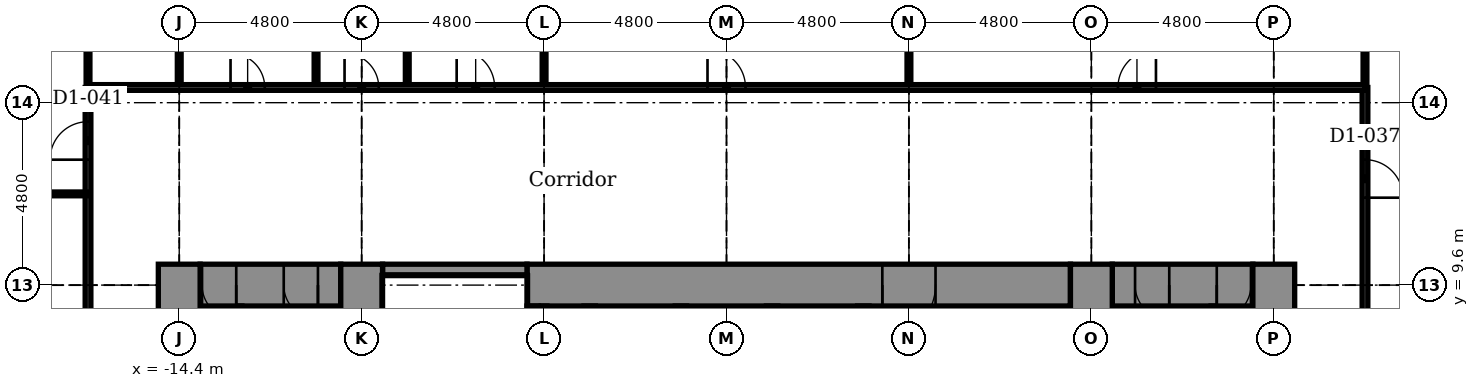
"""IFC4 building model, lengths in metres.
Left out: names, types, materials, properties, quantities, classifications, styles, units other than length and angle.
Written with IfcOpenShell. Run it as: python <this file> out.ifc"""

import sys

from ifc_helpers import new_model, si_unit, direction, frame, frame_2d, origin, place, context, subcontext, project, spatial, rectangle, extrude, element, fill, save


model = new_model("IFC4")
c1 = context("Model", 3, precision=1e-05, world=origin(), true_north=direction((0.0, 1.0)))
c2 = subcontext(c1, "Body", "Model", "MODEL_VIEW")
j1 = project(units=[si_unit("LENGTHUNIT", "METRE"), si_unit("PLANEANGLEUNIT", "RADIAN")], contexts=[c1])
p1 = place(None, origin())
s1 = spatial("IfcSite", under=j1, at=p1, CompositionType="ELEMENT")
p2 = place(p1, origin())
s2 = spatial("IfcBuilding", under=s1, at=p2, CompositionType="ELEMENT")
p3 = place(p2, frame((0.0, 0.0, 12.4)))
s3 = spatial("IfcBuildingStorey", under=s2, at=p3, CompositionType="ELEMENT", Elevation=12.4)
p4 = place(p3, frame((-13.85, 9.6, -0.3), z_axis=(0.0, 0.0, 1.0), x_axis=(1.0, 0.0, 0.0)))
e1 = element("IfcWall", 1, at=p4, inside=s3, PredefinedType="SHEAR", context=c2, shape_type="SweptSolid", body=[
    extrude(rectangle(XDim=3.7, YDim=1.1, at=frame_2d((1.85, 0.0))), origin(), (0.0, 0.0, 1.0), 5.05),
])
p5 = place(p4, frame((0.05, 0.0, 0.3)))
e2 = element("IfcOpeningElement", 2, at=p5, cuts=e1, PredefinedType="OPENING", context=c2, shape_type="SweptSolid", body=[
    extrude(rectangle(XDim=0.9, YDim=2.1, at=frame_2d((0.45, 1.05))), frame((0.0, 0.56, 0.0), z_axis=(0.0, -1.0, 0.0), x_axis=(1.0, 0.0, 0.0)), (0.0, 0.0, 1.0), 1.12),
])
p6 = place(p4, frame((2.2, 0.0, 0.3)))
e3 = element("IfcOpeningElement", 3, at=p6, cuts=e1, PredefinedType="OPENING", context=c2, shape_type="SweptSolid", body=[
    extrude(rectangle(XDim=0.9, YDim=2.1, at=frame_2d((0.45, 1.05))), frame((0.0, 0.56, 0.0), z_axis=(0.0, -1.0, 0.0), x_axis=(1.0, 0.0, 0.0)), (0.0, 0.0, 1.0), 1.12),
])
p7 = place(p3, frame((-5.25, 9.6, -0.3), z_axis=(0.0, 0.0, 1.0), x_axis=(1.0, 0.0, 0.0)))
e4 = element("IfcWall", 4, at=p7, inside=s3, PredefinedType="SHEAR", context=c2, shape_type="SweptSolid", body=[
    extrude(rectangle(XDim=14.3, YDim=1.1, at=frame_2d((7.15, 0.0))), origin(), (0.0, 0.0, 1.0), 5.05),
])
p8 = place(p7, frame((9.35, 0.0, 0.3)))
e5 = element("IfcOpeningElement", 5, at=p8, cuts=e4, PredefinedType="OPENING", context=c2, shape_type="SweptSolid", body=[
    extrude(rectangle(XDim=1.4, YDim=2.1, at=frame_2d((0.7, 1.05))), frame((0.0, 0.56, 0.0), z_axis=(0.0, -1.0, 0.0), x_axis=(1.0, 0.0, 0.0)), (0.0, 0.0, 1.0), 1.12),
])
p9 = place(p3, frame((10.15, 9.6, -0.3), z_axis=(0.0, 0.0, 1.0), x_axis=(1.0, 0.0, 0.0)))
e6 = element("IfcWall", 6, at=p9, inside=s3, PredefinedType="SHEAR", context=c2, shape_type="SweptSolid", body=[
    extrude(rectangle(XDim=3.7, YDim=1.1, at=frame_2d((1.85, 0.0))), origin(), (0.0, 0.0, 1.0), 5.05),
])
p10 = place(p9, frame((0.6, 0.0, 0.3)))
e7 = element("IfcOpeningElement", 7, at=p10, cuts=e6, PredefinedType="OPENING", context=c2, shape_type="SweptSolid", body=[
    extrude(rectangle(XDim=0.9, YDim=2.1, at=frame_2d((0.45, 1.05))), frame((0.0, 0.56, 0.0), z_axis=(0.0, -1.0, 0.0), x_axis=(1.0, 0.0, 0.0)), (0.0, 0.0, 1.0), 1.12),
])
p11 = place(p9, frame((2.75, 0.0, 0.3)))
e8 = element("IfcOpeningElement", 8, at=p11, cuts=e6, PredefinedType="OPENING", context=c2, shape_type="SweptSolid", body=[
    extrude(rectangle(XDim=0.9, YDim=2.1, at=frame_2d((0.45, 1.05))), frame((0.0, 0.56, 0.0), z_axis=(0.0, -1.0, 0.0), x_axis=(1.0, 0.0, 0.0)), (0.0, 0.0, 1.0), 1.12),
])
p12 = place(p3, frame((-9.05, 10.0, -0.3), z_axis=(0.0, 0.0, 1.0), x_axis=(1.0, 0.0, 0.0)))
e9 = element("IfcWall", 9, at=p12, inside=s3, PredefinedType="STANDARD", context=c2, shape_type="SweptSolid", body=[
    extrude(rectangle(XDim=3.8, YDim=0.3, at=frame_2d((1.9, 0.0))), origin(), (0.0, 0.0, 1.0), 5.05),
])
p13 = place(p3, frame((-14.4, -10.15, -0.3), z_axis=(0.0, 0.0, 1.0), x_axis=(0.0, 1.0, 0.0)))
e10 = element("IfcWall", 10, at=p13, inside=s3, PredefinedType="SHEAR", context=c2, shape_type="SweptSolid", body=[
    extrude(rectangle(XDim=20.3, YDim=1.1, at=frame_2d((10.15, 0.0))), origin(), (0.0, 0.0, 1.0), 5.05),
])
p14 = place(p13, frame((3.6, 0.0, 0.3)))
e11 = element("IfcOpeningElement", 11, at=p14, cuts=e10, PredefinedType="OPENING", context=c2, shape_type="SweptSolid", body=[
    extrude(rectangle(XDim=1.1, YDim=2.1, at=frame_2d((0.55, 1.05))), frame((0.0, 0.56, 0.0), z_axis=(0.0, -1.0, 0.0), x_axis=(1.0, 0.0, 0.0)), (0.0, 0.0, 1.0), 1.12),
])
p15 = place(p13, frame((6.0, 0.0, 0.3)))
e12 = element("IfcOpeningElement", 12, at=p15, cuts=e10, PredefinedType="OPENING", context=c2, shape_type="SweptSolid", body=[
    extrude(rectangle(XDim=1.1, YDim=2.1, at=frame_2d((0.55, 1.05))), frame((0.0, 0.56, 0.0), z_axis=(0.0, -1.0, 0.0), x_axis=(1.0, 0.0, 0.0)), (0.0, 0.0, 1.0), 1.12),
])
p16 = place(p13, frame((8.4, 0.0, 0.3)))
e13 = element("IfcOpeningElement", 13, at=p16, cuts=e10, PredefinedType="OPENING", context=c2, shape_type="SweptSolid", body=[
    extrude(rectangle(XDim=1.1, YDim=2.1, at=frame_2d((0.55, 1.05))), frame((0.0, 0.56, 0.0), z_axis=(0.0, -1.0, 0.0), x_axis=(1.0, 0.0, 0.0)), (0.0, 0.0, 1.0), 1.12),
])
p17 = place(p13, frame((10.8, 0.0, 0.3)))
e14 = element("IfcOpeningElement", 14, at=p17, cuts=e10, PredefinedType="OPENING", context=c2, shape_type="SweptSolid", body=[
    extrude(rectangle(XDim=1.1, YDim=2.1, at=frame_2d((0.55, 1.05))), frame((0.0, 0.56, 0.0), z_axis=(0.0, -1.0, 0.0), x_axis=(1.0, 0.0, 0.0)), (0.0, 0.0, 1.0), 1.12),
])
p18 = place(p3, frame((-9.6, 2.55, -0.3), z_axis=(0.0, 0.0, 1.0), x_axis=(0.0, 1.0, 0.0)))
e15 = element("IfcWall", 15, at=p18, inside=s3, PredefinedType="SHEAR", context=c2, shape_type="SweptSolid", body=[
    extrude(rectangle(XDim=7.6, YDim=1.1, at=frame_2d((3.8, 0.0))), origin(), (0.0, 0.0, 1.0), 5.05),
])
p19 = place(p3, frame((-5.1, 2.25, -0.3), z_axis=(0.0, 0.0, 1.0), x_axis=(0.0, 1.0, 0.0)))
e16 = element("IfcWall", 16, at=p19, inside=s3, PredefinedType="STANDARD", context=c2, shape_type="SweptSolid", body=[
    extrude(rectangle(XDim=6.8, YDim=0.3, at=frame_2d((3.4, 0.0))), origin(), (0.0, 0.0, 1.0), 5.05),
])
p20 = place(p19, frame((2.0, 0.0, 0.3)))
e17 = element("IfcOpeningElement", 17, at=p20, cuts=e16, PredefinedType="OPENING", context=c2, shape_type="SweptSolid", body=[
    extrude(rectangle(XDim=1.2, YDim=2.1, at=frame_2d((0.6, 1.05))), frame((0.0, 0.16, 0.0), z_axis=(0.0, -1.0, 0.0), x_axis=(1.0, 0.0, 0.0)), (0.0, 0.0, 1.0), 0.32),
])
for number, where, z_axis, x_axis in (
    (18, (-3.6, 5.85, -0.3), (0.0, 0.0, 1.0), (0.0, 1.0, 0.0)),
    (19, (-1.2, 5.85, -0.3), (0.0, 0.0, 1.0), (0.0, 1.0, 0.0)),
    (20, (1.2, 5.85, -0.3), (0.0, 0.0, 1.0), (0.0, 1.0, 0.0)),
    (21, (3.6, 5.85, -0.3), (0.0, 0.0, 1.0), (0.0, 1.0, 0.0)),
):
    element("IfcWall", number, at=place(p3, frame(where, z_axis=z_axis, x_axis=x_axis)), inside=s3, PredefinedType="STANDARD", context=c2, shape_type="SweptSolid", body=[
        extrude(rectangle(XDim=3.2, YDim=0.3, at=frame_2d((1.6, 0.0))), origin(), (0.0, 0.0, 1.0), 5.05),
    ])
p21 = place(p3, frame((9.6, -10.15, -0.3), z_axis=(0.0, 0.0, 1.0), x_axis=(0.0, 1.0, 0.0)))
e22 = element("IfcWall", 22, at=p21, inside=s3, PredefinedType="SHEAR", context=c2, shape_type="SweptSolid", body=[
    extrude(rectangle(XDim=20.3, YDim=1.1, at=frame_2d((10.15, 0.0))), origin(), (0.0, 0.0, 1.0), 5.05),
])
p22 = place(p3, frame((14.4, -10.15, -0.3), z_axis=(0.0, 0.0, 1.0), x_axis=(0.0, 1.0, 0.0)))
e23 = element("IfcWall", 23, at=p22, inside=s3, PredefinedType="SHEAR", context=c2, shape_type="SweptSolid", body=[
    extrude(rectangle(XDim=20.3, YDim=1.1, at=frame_2d((10.15, 0.0))), origin(), (0.0, 0.0, 1.0), 5.05),
])
p23 = place(p22, frame((3.6, 0.0, 0.3)))
e24 = element("IfcOpeningElement", 24, at=p23, cuts=e23, PredefinedType="OPENING", context=c2, shape_type="SweptSolid", body=[
    extrude(rectangle(XDim=1.1, YDim=2.1, at=frame_2d((0.55, 1.05))), frame((0.0, 0.56, 0.0), z_axis=(0.0, -1.0, 0.0), x_axis=(1.0, 0.0, 0.0)), (0.0, 0.0, 1.0), 1.12),
])
p24 = place(p22, frame((6.0, 0.0, 0.3)))
e25 = element("IfcOpeningElement", 25, at=p24, cuts=e23, PredefinedType="OPENING", context=c2, shape_type="SweptSolid", body=[
    extrude(rectangle(XDim=1.1, YDim=2.1, at=frame_2d((0.55, 1.05))), frame((0.0, 0.56, 0.0), z_axis=(0.0, -1.0, 0.0), x_axis=(1.0, 0.0, 0.0)), (0.0, 0.0, 1.0), 1.12),
])
p25 = place(p22, frame((8.4, 0.0, 0.3)))
e26 = element("IfcOpeningElement", 26, at=p25, cuts=e23, PredefinedType="OPENING", context=c2, shape_type="SweptSolid", body=[
    extrude(rectangle(XDim=1.1, YDim=2.1, at=frame_2d((0.55, 1.05))), frame((0.0, 0.56, 0.0), z_axis=(0.0, -1.0, 0.0), x_axis=(1.0, 0.0, 0.0)), (0.0, 0.0, 1.0), 1.12),
])
p26 = place(p22, frame((10.8, 0.0, 0.3)))
e27 = element("IfcOpeningElement", 27, at=p26, cuts=e23, PredefinedType="OPENING", context=c2, shape_type="SweptSolid", body=[
    extrude(rectangle(XDim=1.1, YDim=2.1, at=frame_2d((0.55, 1.05))), frame((0.0, 0.56, 0.0), z_axis=(0.0, -1.0, 0.0), x_axis=(1.0, 0.0, 0.0)), (0.0, 0.0, 1.0), 1.12),
])
p27 = place(p3, frame((16.8, 14.8, 0.0), z_axis=(0.0, 0.0, 1.0), x_axis=(0.0, 1.0, 0.0)))
e28 = element("IfcWall", 28, at=p27, inside=s3, PredefinedType="PARTITIONING", context=c2, shape_type="SweptSolid", body=[
    extrude(rectangle(XDim=26.599, YDim=0.1, at=frame_2d((13.3, 0.0))), origin(), (0.0, 0.0, 1.0), 4.7),
])
p28 = place(p3, frame((16.8, 3.95, 0.0), z_axis=(0.0, 0.0, 1.0), x_axis=(0.0, 1.0, 0.0)))
e29 = element("IfcWall", 29, at=p28, inside=s3, PredefinedType="PARTITIONING", context=c2, shape_type="SweptSolid", body=[
    extrude(rectangle(XDim=10.85, YDim=0.15, at=frame_2d((5.425, 0.0))), origin(), (0.0, 0.0, 1.0), 4.7),
])
p29 = place(p28, frame((1.25, 0.0, 0.0)))
e30 = element("IfcOpeningElement", 30, at=p29, cuts=e29, PredefinedType="OPENING", context=c2, shape_type="SweptSolid", body=[
    extrude(rectangle(XDim=1.0, YDim=2.1, at=frame_2d((0.5, 1.05))), frame((0.0, 0.085, 0.0), z_axis=(0.0, -1.0, 0.0), x_axis=(1.0, 0.0, 0.0)), (0.0, 0.0, 1.0), 0.17),
])
p30 = place(p28, frame((7.95, 0.0, 0.0)))
e31 = element("IfcOpeningElement", 31, at=p30, cuts=e29, PredefinedType="OPENING", context=c2, shape_type="SweptSolid", body=[
    extrude(rectangle(XDim=1.0, YDim=2.1, at=frame_2d((0.5, 1.05))), frame((0.0, 0.085, 0.0), z_axis=(0.0, -1.0, 0.0), x_axis=(1.0, 0.0, 0.0)), (0.0, 0.0, 1.0), 0.17),
])
p31 = place(p3, frame((12.8, 7.35, 0.0), z_axis=(0.0, 0.0, 1.0), x_axis=(0.0, 1.0, 0.0)))
e32 = element("IfcWall", 32, at=p31, inside=s3, PredefinedType="PARTITIONING", context=c2, shape_type="SweptSolid", body=[
    extrude(rectangle(XDim=1.7, YDim=0.1, at=frame_2d((0.85, 0.0))), origin(), (0.0, 0.0, 1.0), 4.7),
])
for number, where, z_axis, x_axis in (
    (33, (4.8, 14.8, 0.0), (0.0, 0.0, 1.0), (0.0, 1.0, 0.0)),
    (34, (-4.8, 14.8, 0.0), (0.0, 0.0, 1.0), (0.0, 1.0, 0.0)),
):
    element("IfcWall", number, at=place(p3, frame(where, z_axis=z_axis, x_axis=x_axis)), inside=s3, PredefinedType="PARTITIONING", context=c2, shape_type="SweptSolid", body=[
        extrude(rectangle(XDim=4.326, YDim=0.1, at=frame_2d((2.163, 0.0))), origin(), (0.0, 0.0, 1.0), 4.343),
    ])
p32 = place(p3, frame((-4.8, 6.0, 0.0), z_axis=(0.0, 0.0, 1.0), x_axis=(0.0, 1.0, 0.0)))
e35 = element("IfcWall", 35, at=p32, inside=s3, PredefinedType="PARTITIONING", context=c2, shape_type="SweptSolid", body=[
    extrude(rectangle(XDim=3.05, YDim=0.15, at=frame_2d((1.525, 0.0))), origin(), (0.0, 0.0, 1.0), 4.7),
])
for number, where, z_axis, x_axis in (
    (36, (-8.4, 14.8, 0.0), (0.0, 0.0, 1.0), (0.0, 1.0, 0.0)),
    (37, (-10.8, 14.8, 0.0), (0.0, 0.0, 1.0), (0.0, 1.0, 0.0)),
):
    element("IfcWall", number, at=place(p3, frame(where, z_axis=z_axis, x_axis=x_axis)), inside=s3, PredefinedType="PARTITIONING", context=c2, shape_type="SweptSolid", body=[
        extrude(rectangle(XDim=6.0, YDim=0.1, at=frame_2d((3.0, 0.0))), origin(), (0.0, 0.0, 1.0), 4.7),
    ])
p33 = place(p3, frame((-12.8, 7.35, 0.0), z_axis=(0.0, 0.0, 1.0), x_axis=(0.0, 1.0, 0.0)))
e38 = element("IfcWall", 38, at=p33, inside=s3, PredefinedType="PARTITIONING", context=c2, shape_type="SweptSolid", body=[
    extrude(rectangle(XDim=1.7, YDim=0.1, at=frame_2d((0.85, 0.0))), origin(), (0.0, 0.0, 1.0), 4.7),
])
p34 = place(p3, frame((-14.4, 14.8, 0.0), z_axis=(0.0, 0.0, 1.0), x_axis=(0.0, 1.0, 0.0)))
e39 = element("IfcWall", 39, at=p34, inside=s3, PredefinedType="PARTITIONING", context=c2, shape_type="SweptSolid", body=[
    extrude(rectangle(XDim=4.326, YDim=0.1, at=frame_2d((2.163, 0.0))), origin(), (0.0, 0.0, 1.0), 4.343),
])
p35 = place(p3, frame((-16.8, 14.8, 0.0), z_axis=(0.0, 0.0, 1.0), x_axis=(0.0, 1.0, 0.0)))
e40 = element("IfcWall", 40, at=p35, inside=s3, PredefinedType="PARTITIONING", context=c2, shape_type="SweptSolid", body=[
    extrude(rectangle(XDim=26.599, YDim=0.1, at=frame_2d((13.3, 0.0))), origin(), (0.0, 0.0, 1.0), 4.7),
])
p36 = place(p3, frame((-16.8, 3.95, 0.0), z_axis=(0.0, 0.0, 1.0), x_axis=(0.0, 1.0, 0.0)))
e41 = element("IfcWall", 41, at=p36, inside=s3, PredefinedType="PARTITIONING", context=c2, shape_type="SweptSolid", body=[
    extrude(rectangle(XDim=10.85, YDim=0.15, at=frame_2d((5.425, 0.0))), origin(), (0.0, 0.0, 1.0), 4.7),
])
p37 = place(p36, frame((2.45, 0.0, 0.0)))
e42 = element("IfcOpeningElement", 42, at=p37, cuts=e41, PredefinedType="OPENING", context=c2, shape_type="SweptSolid", body=[
    extrude(rectangle(XDim=1.0, YDim=2.1, at=frame_2d((0.5, 1.05))), frame((0.0, 0.085, 0.0), z_axis=(0.0, -1.0, 0.0), x_axis=(1.0, 0.0, 0.0)), (0.0, 0.0, 1.0), 0.17),
])
p38 = place(p36, frame((8.95, 0.0, 0.0)))
e43 = element("IfcOpeningElement", 43, at=p38, cuts=e41, PredefinedType="OPENING", context=c2, shape_type="SweptSolid", body=[
    extrude(rectangle(XDim=1.0, YDim=2.1, at=frame_2d((0.5, 1.05))), frame((0.0, 0.085, 0.0), z_axis=(0.0, -1.0, 0.0), x_axis=(1.0, 0.0, 0.0)), (0.0, 0.0, 1.0), 0.17),
])
p39 = place(p3, frame((-39.888, 12.0, 0.0), z_axis=(0.0, 0.0, 1.0), x_axis=(1.0, 0.0, 0.0)))
e44 = element("IfcWall", 44, at=p39, inside=s3, PredefinedType="PARTITIONING", context=c2, shape_type="SweptSolid", body=[
    extrude(rectangle(XDim=23.088, YDim=0.1, at=frame_2d((11.544, 0.0))), origin(), (0.0, 0.0, 1.0), 4.7),
])
p40 = place(p3, frame((-16.8, 14.8, 0.0), z_axis=(0.0, 0.0, 1.0), x_axis=(1.0, 0.0, 0.0)))
e45 = element("IfcWall", 45, at=p40, inside=s3, PredefinedType="PARTITIONING", context=c2, shape_type="SweptSolid", body=[
    extrude(rectangle(XDim=33.6, YDim=0.15, at=frame_2d((16.8, 0.0))), origin(), (0.0, 0.0, 1.0), 4.7),
])
p41 = place(p40, frame((3.75, 0.0, 0.0)))
e46 = element("IfcOpeningElement", 46, at=p41, cuts=e45, PredefinedType="OPENING", context=c2, shape_type="SweptSolid", body=[
    extrude(rectangle(XDim=0.9, YDim=2.1, at=frame_2d((0.45, 1.05))), frame((0.0, 0.085, 0.0), z_axis=(0.0, -1.0, 0.0), x_axis=(1.0, 0.0, 0.0)), (0.0, 0.0, 1.0), 0.17),
])
p42 = place(p40, frame((6.75, 0.0, 0.0)))
e47 = element("IfcOpeningElement", 47, at=p42, cuts=e45, PredefinedType="OPENING", context=c2, shape_type="SweptSolid", body=[
    extrude(rectangle(XDim=0.9, YDim=2.1, at=frame_2d((0.45, 1.05))), frame((0.0, 0.085, 0.0), z_axis=(0.0, -1.0, 0.0), x_axis=(1.0, 0.0, 0.0)), (0.0, 0.0, 1.0), 0.17),
])
p43 = place(p40, frame((9.7, 0.0, 0.0)))
e48 = element("IfcOpeningElement", 48, at=p43, cuts=e45, PredefinedType="OPENING", context=c2, shape_type="SweptSolid", body=[
    extrude(rectangle(XDim=1.0, YDim=2.1, at=frame_2d((0.5, 1.05))), frame((0.0, 0.085, 0.0), z_axis=(0.0, -1.0, 0.0), x_axis=(1.0, 0.0, 0.0)), (0.0, 0.0, 1.0), 0.17),
])
p44 = place(p40, frame((16.3, 0.0, 0.0)))
e49 = element("IfcOpeningElement", 49, at=p44, cuts=e45, PredefinedType="OPENING", context=c2, shape_type="SweptSolid", body=[
    extrude(rectangle(XDim=1.0, YDim=2.1, at=frame_2d((0.5, 1.05))), frame((0.0, 0.085, 0.0), z_axis=(0.0, -1.0, 0.0), x_axis=(1.0, 0.0, 0.0)), (0.0, 0.0, 1.0), 0.17),
])
p45 = place(p40, frame((27.1, 0.0, 0.0)))
e50 = element("IfcOpeningElement", 50, at=p45, cuts=e45, PredefinedType="OPENING", context=c2, shape_type="SweptSolid", body=[
    extrude(rectangle(XDim=1.0, YDim=2.1, at=frame_2d((0.5, 1.05))), frame((0.0, 0.085, 0.0), z_axis=(0.0, -1.0, 0.0), x_axis=(1.0, 0.0, 0.0)), (0.0, 0.0, 1.0), 0.17),
])
p46 = place(p41, origin())
e51 = element("IfcDoor", 51, at=p46, inside=s3, OperationType="SINGLE_SWING_LEFT", PredefinedType="DOOR", context=c2, shape_type="SweptSolid", body=[
    extrude(rectangle(XDim=0.9, YDim=2.1, at=frame_2d((0.45, 1.05))), frame((0.0, 0.025, 0.0), z_axis=(0.0, -1.0, 0.0), x_axis=(1.0, 0.0, 0.0)), (0.0, 0.0, 1.0), 0.05),
])
fill(e46, e51)
p47 = place(p42, origin())
e52 = element("IfcDoor", 52, at=p47, inside=s3, OperationType="SINGLE_SWING_LEFT", PredefinedType="DOOR", context=c2, shape_type="SweptSolid", body=[
    extrude(rectangle(XDim=0.9, YDim=2.1, at=frame_2d((0.45, 1.05))), frame((0.0, 0.025, 0.0), z_axis=(0.0, -1.0, 0.0), x_axis=(1.0, 0.0, 0.0)), (0.0, 0.0, 1.0), 0.05),
])
fill(e47, e52)
p48 = place(p43, origin())
e53 = element("IfcDoor", 53, at=p48, inside=s3, OperationType="SINGLE_SWING_LEFT", PredefinedType="DOOR", context=c2, shape_type="SweptSolid", body=[
    extrude(rectangle(XDim=1.0, YDim=2.1, at=frame_2d((0.5, 1.05))), frame((0.0, 0.025, 0.0), z_axis=(0.0, -1.0, 0.0), x_axis=(1.0, 0.0, 0.0)), (0.0, 0.0, 1.0), 0.05),
])
fill(e48, e53)
p49 = place(p44, origin())
e54 = element("IfcDoor", 54, at=p49, inside=s3, OperationType="SINGLE_SWING_LEFT", PredefinedType="DOOR", context=c2, shape_type="SweptSolid", body=[
    extrude(rectangle(XDim=1.0, YDim=2.1, at=frame_2d((0.5, 1.05))), frame((0.0, 0.025, 0.0), z_axis=(0.0, -1.0, 0.0), x_axis=(1.0, 0.0, 0.0)), (0.0, 0.0, 1.0), 0.05),
])
fill(e49, e54)
p50 = place(p45, origin())
e55 = element("IfcDoor", 55, at=p50, inside=s3, OperationType="SINGLE_SWING_RIGHT", PredefinedType="DOOR", context=c2, shape_type="SweptSolid", body=[
    extrude(rectangle(XDim=1.0, YDim=2.1, at=frame_2d((0.5, 1.05))), frame((0.0, 0.025, 0.0), z_axis=(0.0, -1.0, 0.0), x_axis=(1.0, 0.0, 0.0)), (0.0, 0.0, 1.0), 0.05),
])
fill(e50, e55)
p51 = place(p30, frame((1.0, 0.0, 0.0), z_axis=(0.0, 0.0, 1.0), x_axis=(-1.0, 0.0, 0.0)))
e56 = element("IfcDoor", 56, at=p51, inside=s3, OperationType="SINGLE_SWING_LEFT", PredefinedType="DOOR", context=c2, shape_type="SweptSolid", body=[
    extrude(rectangle(XDim=1.0, YDim=2.1, at=frame_2d((0.5, 1.05))), frame((0.0, 0.025, 0.0), z_axis=(0.0, -1.0, 0.0), x_axis=(1.0, 0.0, 0.0)), (0.0, 0.0, 1.0), 0.05),
])
fill(e31, e56)
p52 = place(p38, origin())
e57 = element("IfcDoor", 57, at=p52, inside=s3, OperationType="SINGLE_SWING_LEFT", PredefinedType="DOOR", context=c2, shape_type="SweptSolid", body=[
    extrude(rectangle(XDim=1.0, YDim=2.1, at=frame_2d((0.5, 1.05))), frame((0.0, 0.025, 0.0), z_axis=(0.0, -1.0, 0.0), x_axis=(1.0, 0.0, 0.0)), (0.0, 0.0, 1.0), 0.05),
])
fill(e43, e57)
p53 = place(p10, frame((0.9, 0.0, 0.0), z_axis=(0.0, 0.0, 1.0), x_axis=(-1.0, 0.0, 0.0)))
e58 = element("IfcDoor", 58, at=p53, inside=s3, OperationType="SINGLE_SWING_RIGHT", PredefinedType="DOOR", context=c2, shape_type="SweptSolid", body=[
    extrude(rectangle(XDim=0.9, YDim=2.1, at=frame_2d((0.45, 1.05))), frame((0.0, 0.025, 0.0), z_axis=(0.0, -1.0, 0.0), x_axis=(1.0, 0.0, 0.0)), (0.0, 0.0, 1.0), 0.05),
])
fill(e7, e58)
p54 = place(p11, frame((0.9, 0.0, 0.0), z_axis=(0.0, 0.0, 1.0), x_axis=(-1.0, 0.0, 0.0)))
e59 = element("IfcDoor", 59, at=p54, inside=s3, OperationType="SINGLE_SWING_LEFT", PredefinedType="DOOR", context=c2, shape_type="SweptSolid", body=[
    extrude(rectangle(XDim=0.9, YDim=2.1, at=frame_2d((0.45, 1.05))), frame((0.0, 0.025, 0.0), z_axis=(0.0, -1.0, 0.0), x_axis=(1.0, 0.0, 0.0)), (0.0, 0.0, 1.0), 0.05),
])
fill(e8, e59)
p55 = place(p5, frame((0.9, 0.0, 0.0), z_axis=(0.0, 0.0, 1.0), x_axis=(-1.0, 0.0, 0.0)))
e60 = element("IfcDoor", 60, at=p55, inside=s3, OperationType="SINGLE_SWING_RIGHT", PredefinedType="DOOR", context=c2, shape_type="SweptSolid", body=[
    extrude(rectangle(XDim=0.9, YDim=2.1, at=frame_2d((0.45, 1.05))), frame((0.0, 0.025, 0.0), z_axis=(0.0, -1.0, 0.0), x_axis=(1.0, 0.0, 0.0)), (0.0, 0.0, 1.0), 0.05),
])
fill(e2, e60)
p56 = place(p6, frame((0.9, 0.0, 0.0), z_axis=(0.0, 0.0, 1.0), x_axis=(-1.0, 0.0, 0.0)))
e61 = element("IfcDoor", 61, at=p56, inside=s3, OperationType="SINGLE_SWING_RIGHT", PredefinedType="DOOR", context=c2, shape_type="SweptSolid", body=[
    extrude(rectangle(XDim=0.9, YDim=2.1, at=frame_2d((0.45, 1.05))), frame((0.0, 0.025, 0.0), z_axis=(0.0, -1.0, 0.0), x_axis=(1.0, 0.0, 0.0)), (0.0, 0.0, 1.0), 0.05),
])
fill(e3, e61)
p57 = place(p8, frame((1.4, 0.0, 0.0), z_axis=(0.0, 0.0, 1.0), x_axis=(-1.0, 0.0, 0.0)))
e62 = element("IfcDoor", 62, at=p57, inside=s3, OperationType="SINGLE_SWING_LEFT", PredefinedType="DOOR", context=c2, shape_type="SweptSolid", body=[
    extrude(rectangle(XDim=1.4, YDim=2.1, at=frame_2d((0.7, 1.05))), frame((0.0, 0.025, 0.0), z_axis=(0.0, -1.0, 0.0), x_axis=(1.0, 0.0, 0.0)), (0.0, 0.0, 1.0), 0.05),
])
fill(e5, e62)
save(model, sys.argv[1])
